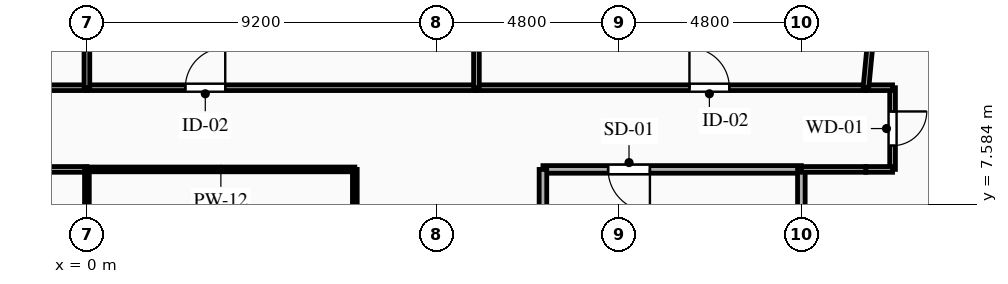
"""IFC4 building model, lengths in metres.
Left out: names, types, materials, properties, quantities, classifications, styles, units other than length and angle.
Written with IfcOpenShell. Run it as: python <this file> out.ifc"""

import sys

from ifc_helpers import new_model, si_unit, direction, frame, frame_2d, origin, place, context, subcontext, project, spatial, rectangle, extrude, element, fill, save


model = new_model("IFC4")
c1 = context("Model", 3, precision=1e-05, world=origin(), true_north=direction((0.0, 1.0)))
c2 = subcontext(c1, "Body", "Model", "MODEL_VIEW")
j1 = project(units=[si_unit("LENGTHUNIT", "METRE"), si_unit("PLANEANGLEUNIT", "RADIAN")], contexts=[c1])
p1 = place(None, origin())
s1 = spatial("IfcSite", under=j1, at=p1, CompositionType="ELEMENT")
p2 = place(p1, origin())
s2 = spatial("IfcBuilding", under=s1, at=p2, CompositionType="ELEMENT")
p3 = place(p2, frame((0.0, 0.0, 231.65)))
s3 = spatial("IfcBuildingStorey", under=s2, at=p3, CompositionType="ELEMENT", Elevation=231.65)
p4 = place(p3, frame((18.8, 8.5, 0.0), z_axis=(0.0, 0.0, 1.0), x_axis=(-1.0, 0.0, 0.0)))
e1 = element("IfcWall", 1, at=p4, inside=s3, PredefinedType="PARTITIONING", context=c2, shape_type="SweptSolid", body=[
    extrude(rectangle(XDim=6.8, YDim=0.2, at=frame_2d((3.4, 0.0))), origin(), (0.0, 0.0, 1.0), 3.04),
])
p5 = place(p4, frame((3.985, 0.0, 0.0)))
e2 = element("IfcOpeningElement", 2, at=p5, cuts=e1, PredefinedType="OPENING", context=c2, shape_type="SweptSolid", body=[
    extrude(rectangle(XDim=1.1, YDim=2.15, at=frame_2d((0.55, 1.075))), frame((0.0, 0.11, 0.0), z_axis=(0.0, -1.0, 0.0), x_axis=(1.0, 0.0, 0.0)), (0.0, 0.0, 1.0), 0.22),
])
p6 = place(p3, frame((12.0, 8.5, 0.0), z_axis=(0.0, 0.0, 1.0), x_axis=(0.0, -1.0, 0.0)))
e3 = element("IfcWall", 3, at=p6, inside=s3, PredefinedType="PARTITIONING", context=c2, shape_type="SweptSolid", body=[
    extrude(rectangle(XDim=2.9, YDim=0.2, at=frame_2d((1.45, 0.0))), origin(), (0.0, 0.0, 1.0), 3.04),
])
p7 = place(p3, frame((18.8, 5.6, 0.0), z_axis=(0.0, 0.0, 1.0), x_axis=(0.0, 1.0, 0.0)))
e4 = element("IfcWall", 4, at=p7, inside=s3, PredefinedType="PARTITIONING", context=c2, shape_type="SweptSolid", body=[
    extrude(rectangle(XDim=2.9, YDim=0.2, at=frame_2d((1.45, 0.0))), origin(), (0.0, 0.0, 1.0), 2.665),
])
p8 = place(p3, frame((-7.9, 10.65, 0.0), z_axis=(0.0, 0.0, 1.0), x_axis=(1.0, 0.0, 0.0)))
e5 = element("IfcWall", 5, at=p8, inside=s3, PredefinedType="PARTITIONING", context=c2, shape_type="SweptSolid", body=[
    extrude(rectangle(XDim=7.9, YDim=0.15, at=frame_2d((3.95, 0.0))), origin(), (0.0, 0.0, 1.0), 3.04),
])
p9 = place(p8, frame((3.475, 0.0, 0.0)))
e6 = element("IfcOpeningElement", 6, at=p9, cuts=e5, PredefinedType="OPENING", context=c2, shape_type="SweptSolid", body=[
    extrude(rectangle(XDim=0.95, YDim=2.1, at=frame_2d((0.475, 1.05))), frame((0.0, 0.085, 0.0), z_axis=(0.0, -1.0, 0.0), x_axis=(1.0, 0.0, 0.0)), (0.0, 0.0, 1.0), 0.17),
])
p10 = place(p3, frame((0.0, 8.5, 0.0), z_axis=(0.0, 0.0, 1.0), x_axis=(-1.0, 0.0, 0.0)))
e7 = element("IfcWall", 7, at=p10, inside=s3, PredefinedType="PARTITIONING", context=c2, shape_type="SweptSolid", body=[
    extrude(rectangle(XDim=7.05, YDim=0.15, at=frame_2d((3.525, 0.0))), origin(), (0.0, 0.0, 1.0), 3.04),
])
p11 = place(p3, frame((21.2, 10.65, 0.0), z_axis=(0.0, 0.0, 1.0), x_axis=(0.0, -1.0, 0.0)))
e8 = element("IfcWall", 8, at=p11, inside=s3, PredefinedType="PARTITIONING", context=c2, shape_type="SweptSolid", body=[
    extrude(rectangle(XDim=2.15, YDim=0.15, at=frame_2d((1.075, 0.0))), origin(), (0.0, 0.0, 1.0), 3.04),
])
p12 = place(p11, frame((0.625, 0.0, 0.0)))
e9 = element("IfcOpeningElement", 9, at=p12, cuts=e8, PredefinedType="OPENING", context=c2, shape_type="SweptSolid", body=[
    extrude(rectangle(XDim=0.9, YDim=2.1, at=frame_2d((0.45, 1.05))), frame((0.0, 0.085, 0.0), z_axis=(0.0, -1.0, 0.0), x_axis=(1.0, 0.0, 0.0)), (0.0, 0.0, 1.0), 0.17),
])
p13 = place(p3, frame((20.5, 8.5, 0.0), z_axis=(0.0, 0.0, 1.0), x_axis=(-1.0, 0.0, 0.0)))
e10 = element("IfcWall", 10, at=p13, inside=s3, PredefinedType="PARTITIONING", context=c2, shape_type="SweptSolid", body=[
    extrude(rectangle(XDim=1.7, YDim=0.15, at=frame_2d((0.85, 0.0))), origin(), (0.0, 0.0, 1.0), 3.04),
])
for number, where, z_axis, x_axis in (
    (11, (20.5, 10.65, 0.0), (0.0, 0.0, 1.0), (1.0, 0.0, 0.0)),
    (12, (21.2, 8.5, 0.0), (0.0, 0.0, 1.0), (-1.0, 0.0, 0.0)),
):
    element("IfcWall", number, at=place(p3, frame(where, z_axis=z_axis, x_axis=x_axis)), inside=s3, PredefinedType="PARTITIONING", context=c2, shape_type="SweptSolid", body=[
        extrude(rectangle(XDim=0.7, YDim=0.15, at=frame_2d((0.35, 0.0))), origin(), (0.0, 0.0, 1.0), 3.04),
    ])
p14 = place(p3, frame((0.0, 10.65, 0.0), z_axis=(0.0, 0.0, 1.0), x_axis=(1.0, 0.0, 0.0)))
e13 = element("IfcWall", 13, at=p14, inside=s3, PredefinedType="PARTITIONING", context=c2, shape_type="SweptSolid", body=[
    extrude(rectangle(XDim=10.25, YDim=0.15, at=frame_2d((5.125, 0.0))), origin(), (0.0, 0.0, 1.0), 3.04),
])
p15 = place(p14, frame((2.59, 0.0, 0.0)))
e14 = element("IfcOpeningElement", 14, at=p15, cuts=e13, PredefinedType="OPENING", context=c2, shape_type="SweptSolid", body=[
    extrude(rectangle(XDim=1.05, YDim=2.15, at=frame_2d((0.525, 1.075))), frame((0.0, 0.085, 0.0), z_axis=(0.0, -1.0, 0.0), x_axis=(1.0, 0.0, 0.0)), (0.0, 0.0, 1.0), 0.17),
])
p16 = place(p3, frame((10.25, 10.65, 0.0), z_axis=(0.0, 0.0, 1.0), x_axis=(1.0, 0.0, 0.0)))
e15 = element("IfcWall", 15, at=p16, inside=s3, PredefinedType="PARTITIONING", context=c2, shape_type="SweptSolid", body=[
    extrude(rectangle(XDim=10.25, YDim=0.15, at=frame_2d((5.125, 0.0))), origin(), (0.0, 0.0, 1.0), 3.04),
])
p17 = place(p16, frame((5.605, 0.0, 0.0)))
e16 = element("IfcOpeningElement", 16, at=p17, cuts=e15, PredefinedType="OPENING", context=c2, shape_type="SweptSolid", body=[
    extrude(rectangle(XDim=1.05, YDim=2.15, at=frame_2d((0.525, 1.075))), frame((0.0, 0.085, 0.0), z_axis=(0.0, -1.0, 0.0), x_axis=(1.0, 0.0, 0.0)), (0.0, 0.0, 1.0), 0.17),
])
p18 = place(p3, frame((7.05, 8.5, 0.0), z_axis=(0.0, 0.0, 1.0), x_axis=(-1.0, 0.0, 0.0)))
e17 = element("IfcWall", 17, at=p18, inside=s3, PredefinedType="PARTITIONING", context=c2, shape_type="SweptSolid", body=[
    extrude(rectangle(XDim=7.05, YDim=0.125, at=frame_2d((3.525, 0.0))), origin(), (0.0, 0.0, 1.0), 3.04),
])
p19 = place(p3, frame((7.05, -5.6, 0.0), z_axis=(0.0, 0.0, 1.0), x_axis=(0.0, 1.0, 0.0)))
e18 = element("IfcWall", 18, at=p19, inside=s3, PredefinedType="PARTITIONING", context=c2, shape_type="SweptSolid", body=[
    extrude(rectangle(XDim=14.1, YDim=0.125, at=frame_2d((7.05, 0.0))), origin(), (0.0, 0.0, 1.0), 3.04),
])
p20 = place(p19, frame((5.076, 0.0, 0.0)))
e19 = element("IfcOpeningElement", 19, at=p20, cuts=e18, PredefinedType="OPENING", context=c2, shape_type="SweptSolid", body=[
    extrude(rectangle(XDim=0.95, YDim=2.1, at=frame_2d((0.475, 1.05))), frame((0.0, 0.073, 0.0), z_axis=(0.0, -1.0, 0.0), x_axis=(1.0, 0.0, 0.0)), (0.0, 0.0, 1.0), 0.145),
])
p21 = place(p3, frame((20.5, 10.65, 0.0), z_axis=(0.0, 0.0, 1.0), x_axis=(0.094820015289, 0.99549443228, 0.0)))
e20 = element("IfcWall", 20, at=p21, inside=s3, PredefinedType="PARTITIONING", context=c2, shape_type="SweptSolid", body=[
    extrude(rectangle(XDim=3.164, YDim=0.15, at=frame_2d((1.582, 0.0))), origin(), (0.0, 0.0, 1.0), 3.04),
])
for number, where, z_axis, x_axis in (
    (21, (0.0, 15.2, 0.0), (0.0, 0.0, 1.0), (0.0, -1.0, 0.0)),
    (22, (10.25, 15.2, 0.0), (0.0, 0.0, 1.0), (0.0, -1.0, 0.0)),
):
    element("IfcWall", number, at=place(p3, frame(where, z_axis=z_axis, x_axis=x_axis)), inside=s3, PredefinedType="PARTITIONING", context=c2, shape_type="SweptSolid", body=[
        extrude(rectangle(XDim=4.55, YDim=0.15, at=frame_2d((2.275, 0.0))), origin(), (0.0, 0.0, 1.0), 3.04),
    ])
p22 = place(p3, frame((0.0, 8.5, 0.0), z_axis=(0.0, 0.0, 1.0), x_axis=(0.0, -1.0, 0.0)))
e23 = element("IfcWall", 23, at=p22, inside=s3, PredefinedType="PARTITIONING", context=c2, shape_type="SweptSolid", body=[
    extrude(rectangle(XDim=14.1, YDim=0.125, at=frame_2d((7.05, 0.0))), origin(), (0.0, 0.0, 1.0), 3.04),
])
p23 = place(p5, origin())
e24 = element("IfcDoor", 24, at=p23, inside=s3, OperationType="SINGLE_SWING_LEFT", PredefinedType="DOOR", context=c2, shape_type="SweptSolid", body=[
    extrude(rectangle(XDim=1.1, YDim=2.15, at=frame_2d((0.55, 1.075))), frame((0.0, 0.025, 0.0), z_axis=(0.0, -1.0, 0.0), x_axis=(1.0, 0.0, 0.0)), (0.0, 0.0, 1.0), 0.05),
])
fill(e2, e24)
p24 = place(p12, origin())
e25 = element("IfcDoor", 25, at=p24, inside=s3, OperationType="SINGLE_SWING_LEFT", PredefinedType="DOOR", context=c2, shape_type="SweptSolid", body=[
    extrude(rectangle(XDim=0.9, YDim=2.1, at=frame_2d((0.45, 1.05))), frame((0.0, 0.025, 0.0), z_axis=(0.0, -1.0, 0.0), x_axis=(1.0, 0.0, 0.0)), (0.0, 0.0, 1.0), 0.05),
])
fill(e9, e25)
p25 = place(p15, origin())
e26 = element("IfcDoor", 26, at=p25, inside=s3, OperationType="SINGLE_SWING_RIGHT", PredefinedType="DOOR", context=c2, shape_type="SweptSolid", body=[
    extrude(rectangle(XDim=1.05, YDim=2.15, at=frame_2d((0.525, 1.075))), frame((0.0, 0.025, 0.0), z_axis=(0.0, -1.0, 0.0), x_axis=(1.0, 0.0, 0.0)), (0.0, 0.0, 1.0), 0.05),
])
fill(e14, e26)
p26 = place(p17, origin())
e27 = element("IfcDoor", 27, at=p26, inside=s3, OperationType="SINGLE_SWING_LEFT", PredefinedType="DOOR", context=c2, shape_type="SweptSolid", body=[
    extrude(rectangle(XDim=1.05, YDim=2.15, at=frame_2d((0.525, 1.075))), frame((0.0, 0.025, 0.0), z_axis=(0.0, -1.0, 0.0), x_axis=(1.0, 0.0, 0.0)), (0.0, 0.0, 1.0), 0.05),
])
fill(e16, e27)
save(model, sys.argv[1])
